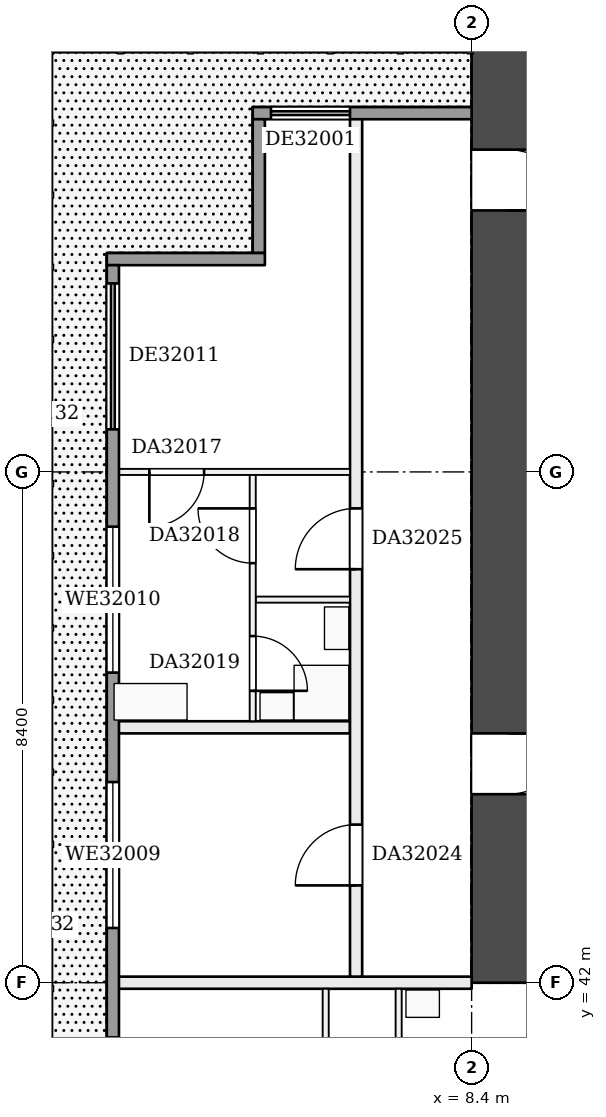
"""IFC4 building model, lengths in metres.
Left out: names, types, materials, properties, quantities, classifications, styles, units other than length and angle.
Written with IfcOpenShell. Run it as: python <this file> out.ifc"""

import sys

from ifc_helpers import new_model, si_unit, direction, frame, frame_2d, origin, place, context, subcontext, project, spatial, rectangle, extrude, element, fill, save


model = new_model("IFC4")
c1 = context("Model", 3, precision=1e-05, world=origin(), true_north=direction((0.0, 1.0)))
c2 = subcontext(c1, "Body", "Model", "MODEL_VIEW")
j1 = project(units=[si_unit("LENGTHUNIT", "METRE"), si_unit("PLANEANGLEUNIT", "RADIAN")], contexts=[c1])
p1 = place(None, origin())
s1 = spatial("IfcSite", under=j1, at=p1, CompositionType="ELEMENT")
p2 = place(p1, origin())
s2 = spatial("IfcBuilding", under=s1, at=p2, CompositionType="ELEMENT")
p3 = place(p2, frame((0.0, 0.0, 126.7)))
s3 = spatial("IfcBuildingStorey", under=s2, at=p3, CompositionType="ELEMENT", Elevation=126.7)
p4 = place(p3, frame((9.0, 58.8, 0.0), z_axis=(0.0, 0.0, 1.0), x_axis=(0.0, -1.0, 0.0)))
e1 = element("IfcWall", 1, at=p4, inside=s3, PredefinedType="SHEAR", context=c2, shape_type="SweptSolid", body=[
    extrude(rectangle(XDim=16.8, YDim=1.2, at=frame_2d((8.4, 0.0))), origin(), (0.0, 0.0, 1.0), 3.22),
])
p5 = place(p4, frame((3.1, 0.0, 0.0)))
e2 = element("IfcOpeningElement", 2, at=p5, cuts=e1, PredefinedType="OPENING", context=c2, shape_type="SweptSolid", body=[
    extrude(rectangle(XDim=1.0, YDim=2.1, at=frame_2d((0.5, 1.05))), frame((0.0, 0.61, 0.0), z_axis=(0.0, -1.0, 0.0), x_axis=(1.0, 0.0, 0.0)), (0.0, 0.0, 1.0), 1.22),
])
p6 = place(p4, frame((12.7, 0.0, 0.0)))
e3 = element("IfcOpeningElement", 3, at=p6, cuts=e1, PredefinedType="OPENING", context=c2, shape_type="SweptSolid", body=[
    extrude(rectangle(XDim=1.0, YDim=2.1, at=frame_2d((0.5, 1.05))), frame((0.0, 0.61, 0.0), z_axis=(0.0, -1.0, 0.0), x_axis=(1.0, 0.0, 0.0)), (0.0, 0.0, 1.0), 1.22),
])
p7 = place(p3, frame((2.5, 42.0, 0.0), z_axis=(0.0, 0.0, 1.0), x_axis=(1.0, 0.0, 0.0)))
e4 = element("IfcWall", 4, at=p7, inside=s3, PredefinedType="PARTITIONING", context=c2, shape_type="SweptSolid", body=[
    extrude(rectangle(XDim=5.9, YDim=0.2, at=frame_2d((2.95, 0.0))), origin(), (0.0, 0.0, 1.0), 3.22),
])
p8 = place(p3, frame((2.5, 46.2, 0.0), z_axis=(0.0, 0.0, 1.0), x_axis=(1.0, 0.0, 0.0)))
e5 = element("IfcWall", 5, at=p8, inside=s3, PredefinedType="PARTITIONING", context=c2, shape_type="SweptSolid", body=[
    extrude(rectangle(XDim=3.9, YDim=0.2, at=frame_2d((1.95, 0.0))), origin(), (0.0, 0.0, 1.0), 3.22),
])
p9 = place(p3, frame((4.85, 48.3, 0.0), z_axis=(0.0, 0.0, 1.0), x_axis=(1.0, 0.0, 0.0)))
e6 = element("IfcWall", 6, at=p9, inside=s3, PredefinedType="PARTITIONING", context=c2, shape_type="SweptSolid", body=[
    extrude(rectangle(XDim=1.55, YDim=0.1, at=frame_2d((0.775, 0.0))), origin(), (0.0, 0.0, 1.0), 3.22),
])
p10 = place(p3, frame((2.5, 50.4, 0.0), z_axis=(0.0, 0.0, 1.0), x_axis=(1.0, 0.0, 0.0)))
e7 = element("IfcWall", 7, at=p10, inside=s3, PredefinedType="PARTITIONING", context=c2, shape_type="SweptSolid", body=[
    extrude(rectangle(XDim=3.9, YDim=0.1, at=frame_2d((1.95, 0.0))), origin(), (0.0, 0.0, 1.0), 3.22),
])
p11 = place(p10, frame((0.6, 0.0, 0.0)))
e8 = element("IfcOpeningElement", 8, at=p11, cuts=e7, PredefinedType="OPENING", context=c2, shape_type="SweptSolid", body=[
    extrude(rectangle(XDim=0.9, YDim=2.1, at=frame_2d((0.45, 1.05))), frame((0.0, 0.06, 0.0), z_axis=(0.0, -1.0, 0.0), x_axis=(1.0, 0.0, 0.0)), (0.0, 0.0, 1.0), 0.12),
])
p12 = place(p3, frame((4.8, 46.3, 0.0), z_axis=(0.0, 0.0, 1.0), x_axis=(0.0, 1.0, 0.0)))
e9 = element("IfcWall", 9, at=p12, inside=s3, PredefinedType="PARTITIONING", context=c2, shape_type="SweptSolid", body=[
    extrude(rectangle(XDim=4.05, YDim=0.1, at=frame_2d((2.025, 0.0))), origin(), (0.0, 0.0, 1.0), 3.22),
])
p13 = place(p12, frame((2.6, 0.0, 0.0)))
e10 = element("IfcOpeningElement", 10, at=p13, cuts=e9, PredefinedType="OPENING", context=c2, shape_type="SweptSolid", body=[
    extrude(rectangle(XDim=0.9, YDim=2.1, at=frame_2d((0.45, 1.05))), frame((0.0, 0.06, 0.0), z_axis=(0.0, -1.0, 0.0), x_axis=(1.0, 0.0, 0.0)), (0.0, 0.0, 1.0), 0.12),
])
p14 = place(p12, frame((0.5, 0.0, 0.0)))
e11 = element("IfcOpeningElement", 11, at=p14, cuts=e9, PredefinedType="OPENING", context=c2, shape_type="SweptSolid", body=[
    extrude(rectangle(XDim=0.9, YDim=2.1, at=frame_2d((0.45, 1.05))), frame((0.0, 0.06, 0.0), z_axis=(0.0, -1.0, 0.0), x_axis=(1.0, 0.0, 0.0)), (0.0, 0.0, 1.0), 0.12),
])
p15 = place(p3, frame((6.0, 16.85, 0.0), z_axis=(0.0, 0.0, 1.0), x_axis=(0.0, 1.0, 0.0)))
e12 = element("IfcWall", 12, at=p15, inside=s3, PredefinedType="PARTITIONING", context=c2, shape_type="SweptSolid", body=[
    extrude(rectangle(XDim=25.05, YDim=0.1, at=frame_2d((12.525, 0.0))), origin(), (0.0, 0.0, 1.0), 3.22),
])
p16 = place(p15, frame((1.55, 0.0, 0.0)))
e13 = element("IfcOpeningElement", 13, at=p16, cuts=e12, PredefinedType="OPENING", context=c2, shape_type="SweptSolid", body=[
    extrude(rectangle(XDim=0.9, YDim=2.1, at=frame_2d((0.45, 1.05))), frame((0.0, 0.06, 0.0), z_axis=(0.0, -1.0, 0.0), x_axis=(1.0, 0.0, 0.0)), (0.0, 0.0, 1.0), 0.12),
])
p17 = place(p15, frame((5.75, 0.0, 0.0)))
e14 = element("IfcOpeningElement", 14, at=p17, cuts=e12, PredefinedType="OPENING", context=c2, shape_type="SweptSolid", body=[
    extrude(rectangle(XDim=0.9, YDim=2.1, at=frame_2d((0.45, 1.05))), frame((0.0, 0.06, 0.0), z_axis=(0.0, -1.0, 0.0), x_axis=(1.0, 0.0, 0.0)), (0.0, 0.0, 1.0), 0.12),
])
p18 = place(p15, frame((14.15, 0.0, 0.0)))
e15 = element("IfcOpeningElement", 15, at=p18, cuts=e12, PredefinedType="OPENING", context=c2, shape_type="SweptSolid", body=[
    extrude(rectangle(XDim=0.9, YDim=2.1, at=frame_2d((0.45, 1.05))), frame((0.0, 0.06, 0.0), z_axis=(0.0, -1.0, 0.0), x_axis=(1.0, 0.0, 0.0)), (0.0, 0.0, 1.0), 0.12),
])
p19 = place(p15, frame((22.55, 0.0, 0.0)))
e16 = element("IfcOpeningElement", 16, at=p19, cuts=e12, PredefinedType="OPENING", context=c2, shape_type="SweptSolid", body=[
    extrude(rectangle(XDim=0.9, YDim=2.1, at=frame_2d((0.45, 1.05))), frame((0.0, 0.06, 0.0), z_axis=(0.0, -1.0, 0.0), x_axis=(1.0, 0.0, 0.0)), (0.0, 0.0, 1.0), 0.12),
])
p20 = place(p3, frame((6.5, 42.1, 0.0), z_axis=(0.0, 0.0, 1.0), x_axis=(0.0, 1.0, 0.0)))
e17 = element("IfcWall", 17, at=p20, inside=s3, PredefinedType="PARTITIONING", context=c2, shape_type="SweptSolid", body=[
    extrude(rectangle(XDim=14.2, YDim=0.2, at=frame_2d((7.1, 0.0))), origin(), (0.0, 0.0, 1.0), 3.22),
])
p21 = place(p20, frame((1.5, 0.0, 0.0)))
e18 = element("IfcOpeningElement", 18, at=p21, cuts=e17, PredefinedType="OPENING", context=c2, shape_type="SweptSolid", body=[
    extrude(rectangle(XDim=1.0, YDim=2.1, at=frame_2d((0.5, 1.05))), frame((0.0, 0.11, 0.0), z_axis=(0.0, -1.0, 0.0), x_axis=(1.0, 0.0, 0.0)), (0.0, 0.0, 1.0), 0.22),
])
p22 = place(p20, frame((6.7, 0.0, 0.0)))
e19 = element("IfcOpeningElement", 19, at=p22, cuts=e17, PredefinedType="OPENING", context=c2, shape_type="SweptSolid", body=[
    extrude(rectangle(XDim=1.0, YDim=2.1, at=frame_2d((0.5, 1.05))), frame((0.0, 0.11, 0.0), z_axis=(0.0, -1.0, 0.0), x_axis=(1.0, 0.0, 0.0)), (0.0, 0.0, 1.0), 0.22),
])
p23 = place(p3, frame((7.2, 21.0, 0.0), z_axis=(0.0, 0.0, 1.0), x_axis=(0.0, 1.0, 0.0)))
e20 = element("IfcWall", 20, at=p23, inside=s3, PredefinedType="PARTITIONING", context=c2, shape_type="SweptSolid", body=[
    extrude(rectangle(XDim=20.9, YDim=0.1, at=frame_2d((10.45, 0.0))), origin(), (0.0, 0.0, 1.0), 3.22),
])
p24 = place(p23, frame((2.837, 0.0, 0.0)))
e21 = element("IfcOpeningElement", 21, at=p24, cuts=e20, PredefinedType="OPENING", context=c2, shape_type="SweptSolid", body=[
    extrude(rectangle(XDim=0.9, YDim=2.1, at=frame_2d((0.45, 1.05))), frame((0.0, 0.06, 0.0), z_axis=(0.0, -1.0, 0.0), x_axis=(1.0, 0.0, 0.0)), (0.0, 0.0, 1.0), 0.12),
])
p25 = place(p23, frame((0.5, 0.0, 0.0)))
e22 = element("IfcOpeningElement", 22, at=p25, cuts=e20, PredefinedType="OPENING", context=c2, shape_type="SweptSolid", body=[
    extrude(rectangle(XDim=0.9, YDim=2.1, at=frame_2d((0.45, 1.05))), frame((0.0, 0.06, 0.0), z_axis=(0.0, -1.0, 0.0), x_axis=(1.0, 0.0, 0.0)), (0.0, 0.0, 1.0), 0.12),
])
p26 = place(p23, frame((5.175, 0.0, 0.0)))
e23 = element("IfcOpeningElement", 23, at=p26, cuts=e20, PredefinedType="OPENING", context=c2, shape_type="SweptSolid", body=[
    extrude(rectangle(XDim=0.9, YDim=2.1, at=frame_2d((0.45, 1.05))), frame((0.0, 0.06, 0.0), z_axis=(0.0, -1.0, 0.0), x_axis=(1.0, 0.0, 0.0)), (0.0, 0.0, 1.0), 0.12),
])
p27 = place(p23, frame((7.613, 0.0, 0.0)))
e24 = element("IfcOpeningElement", 24, at=p27, cuts=e20, PredefinedType="OPENING", context=c2, shape_type="SweptSolid", body=[
    extrude(rectangle(XDim=0.9, YDim=2.1, at=frame_2d((0.45, 1.05))), frame((0.0, 0.06, 0.0), z_axis=(0.0, -1.0, 0.0), x_axis=(1.0, 0.0, 0.0)), (0.0, 0.0, 1.0), 0.12),
])
p28 = place(p23, frame((10.35, 0.0, 0.0)))
e25 = element("IfcOpeningElement", 25, at=p28, cuts=e20, PredefinedType="OPENING", context=c2, shape_type="SweptSolid", body=[
    extrude(rectangle(XDim=0.9, YDim=2.1, at=frame_2d((0.45, 1.05))), frame((0.0, 0.06, 0.0), z_axis=(0.0, -1.0, 0.0), x_axis=(1.0, 0.0, 0.0)), (0.0, 0.0, 1.0), 0.12),
])
p29 = place(p23, frame((13.088, 0.0, 0.0)))
e26 = element("IfcOpeningElement", 26, at=p29, cuts=e20, PredefinedType="OPENING", context=c2, shape_type="SweptSolid", body=[
    extrude(rectangle(XDim=0.9, YDim=2.1, at=frame_2d((0.45, 1.05))), frame((0.0, 0.06, 0.0), z_axis=(0.0, -1.0, 0.0), x_axis=(1.0, 0.0, 0.0)), (0.0, 0.0, 1.0), 0.12),
])
p30 = place(p23, frame((16.125, 0.0, 0.0)))
e27 = element("IfcOpeningElement", 27, at=p30, cuts=e20, PredefinedType="OPENING", context=c2, shape_type="SweptSolid", body=[
    extrude(rectangle(XDim=0.9, YDim=2.1, at=frame_2d((0.45, 1.05))), frame((0.0, 0.06, 0.0), z_axis=(0.0, -1.0, 0.0), x_axis=(1.0, 0.0, 0.0)), (0.0, 0.0, 1.0), 0.12),
])
p31 = place(p23, frame((19.163, 0.0, 0.0)))
e28 = element("IfcOpeningElement", 28, at=p31, cuts=e20, PredefinedType="OPENING", context=c2, shape_type="SweptSolid", body=[
    extrude(rectangle(XDim=0.9, YDim=2.1, at=frame_2d((0.45, 1.05))), frame((0.0, 0.06, 0.0), z_axis=(0.0, -1.0, 0.0), x_axis=(1.0, 0.0, 0.0)), (0.0, 0.0, 1.0), 0.12),
])
p32 = place(p3, frame((8.4, 56.3, 0.0), z_axis=(0.0, 0.0, 1.0), x_axis=(-1.0, 0.0, 0.0)))
e29 = element("IfcWall", 29, at=p32, inside=s3, PredefinedType="SOLIDWALL", context=c2, shape_type="SweptSolid", body=[
    extrude(rectangle(XDim=3.6, YDim=0.2, at=frame_2d((1.8, 0.0))), origin(), (0.0, 0.0, 1.0), 3.22),
])
p33 = place(p32, frame((2.0, 0.0, 0.0)))
e30 = element("IfcOpeningElement", 30, at=p33, cuts=e29, PredefinedType="OPENING", context=c2, shape_type="SweptSolid", body=[
    extrude(rectangle(XDim=1.3, YDim=2.2, at=frame_2d((0.65, 1.1))), frame((0.0, 0.11, 0.0), z_axis=(0.0, -1.0, 0.0), x_axis=(1.0, 0.0, 0.0)), (0.0, 0.0, 1.0), 0.22),
])
p34 = place(p3, frame((4.9, 56.2, 0.0), z_axis=(0.0, 0.0, 1.0), x_axis=(0.0, -1.0, 0.0)))
e31 = element("IfcWall", 31, at=p34, inside=s3, PredefinedType="SOLIDWALL", context=c2, shape_type="SweptSolid", body=[
    extrude(rectangle(XDim=2.2, YDim=0.2, at=frame_2d((1.1, 0.0))), origin(), (0.0, 0.0, 1.0), 3.22),
])
p35 = place(p3, frame((5.0, 53.9, 0.0), z_axis=(0.0, 0.0, 1.0), x_axis=(-1.0, 0.0, 0.0)))
e32 = element("IfcWall", 32, at=p35, inside=s3, PredefinedType="SOLIDWALL", context=c2, shape_type="SweptSolid", body=[
    extrude(rectangle(XDim=2.6, YDim=0.2, at=frame_2d((1.3, 0.0))), origin(), (0.0, 0.0, 1.0), 3.22),
])
p36 = place(p3, frame((2.5, 53.8, 0.0), z_axis=(0.0, 0.0, 1.0), x_axis=(0.0, -1.0, 0.0)))
e33 = element("IfcWall", 33, at=p36, inside=s3, PredefinedType="SOLIDWALL", context=c2, shape_type="SweptSolid", body=[
    extrude(rectangle(XDim=40.4, YDim=0.2, at=frame_2d((20.2, 0.0))), origin(), (0.0, 0.0, 1.0), 3.22),
])
p37 = place(p36, frame((37.7, 0.0, 0.9)))
e34 = element("IfcOpeningElement", 34, at=p37, cuts=e33, PredefinedType="OPENING", context=c2, shape_type="SweptSolid", body=[
    extrude(rectangle(XDim=2.4, YDim=1.5, at=frame_2d((1.2, 0.75))), frame((0.0, 0.11, 0.0), z_axis=(0.0, -1.0, 0.0), x_axis=(1.0, 0.0, 0.0)), (0.0, 0.0, 1.0), 0.22),
])
p38 = place(p36, frame((33.7, 0.0, 0.9)))
e35 = element("IfcOpeningElement", 35, at=p38, cuts=e33, PredefinedType="OPENING", context=c2, shape_type="SweptSolid", body=[
    extrude(rectangle(XDim=2.4, YDim=1.5, at=frame_2d((1.2, 0.75))), frame((0.0, 0.11, 0.0), z_axis=(0.0, -1.0, 0.0), x_axis=(1.0, 0.0, 0.0)), (0.0, 0.0, 1.0), 0.22),
])
p39 = place(p36, frame((29.5, 0.0, 0.9)))
e36 = element("IfcOpeningElement", 36, at=p39, cuts=e33, PredefinedType="OPENING", context=c2, shape_type="SweptSolid", body=[
    extrude(rectangle(XDim=2.4, YDim=1.5, at=frame_2d((1.2, 0.75))), frame((0.0, 0.11, 0.0), z_axis=(0.0, -1.0, 0.0), x_axis=(1.0, 0.0, 0.0)), (0.0, 0.0, 1.0), 0.22),
])
p40 = place(p36, frame((25.3, 0.0, 0.0)))
e37 = element("IfcOpeningElement", 37, at=p40, cuts=e33, PredefinedType="OPENING", context=c2, shape_type="SweptSolid", body=[
    extrude(rectangle(XDim=2.4, YDim=2.2, at=frame_2d((1.2, 1.1))), frame((0.0, 0.11, 0.0), z_axis=(0.0, -1.0, 0.0), x_axis=(1.0, 0.0, 0.0)), (0.0, 0.0, 1.0), 0.22),
])
p41 = place(p36, frame((21.1, 0.0, 0.0)))
e38 = element("IfcOpeningElement", 38, at=p41, cuts=e33, PredefinedType="OPENING", context=c2, shape_type="SweptSolid", body=[
    extrude(rectangle(XDim=2.4, YDim=2.2, at=frame_2d((1.2, 1.1))), frame((0.0, 0.11, 0.0), z_axis=(0.0, -1.0, 0.0), x_axis=(1.0, 0.0, 0.0)), (0.0, 0.0, 1.0), 0.22),
])
p42 = place(p36, frame((16.9, 0.0, 0.0)))
e39 = element("IfcOpeningElement", 39, at=p42, cuts=e33, PredefinedType="OPENING", context=c2, shape_type="SweptSolid", body=[
    extrude(rectangle(XDim=2.4, YDim=2.2, at=frame_2d((1.2, 1.1))), frame((0.0, 0.11, 0.0), z_axis=(0.0, -1.0, 0.0), x_axis=(1.0, 0.0, 0.0)), (0.0, 0.0, 1.0), 0.22),
])
p43 = place(p36, frame((12.7, 0.0, 0.9)))
e40 = element("IfcOpeningElement", 40, at=p43, cuts=e33, PredefinedType="OPENING", context=c2, shape_type="SweptSolid", body=[
    extrude(rectangle(XDim=2.4, YDim=1.5, at=frame_2d((1.2, 0.75))), frame((0.0, 0.11, 0.0), z_axis=(0.0, -1.0, 0.0), x_axis=(1.0, 0.0, 0.0)), (0.0, 0.0, 1.0), 0.22),
])
p44 = place(p36, frame((8.5, 0.0, 0.9)))
e41 = element("IfcOpeningElement", 41, at=p44, cuts=e33, PredefinedType="OPENING", context=c2, shape_type="SweptSolid", body=[
    extrude(rectangle(XDim=2.4, YDim=1.5, at=frame_2d((1.2, 0.75))), frame((0.0, 0.11, 0.0), z_axis=(0.0, -1.0, 0.0), x_axis=(1.0, 0.0, 0.0)), (0.0, 0.0, 1.0), 0.22),
])
p45 = place(p36, frame((4.3, 0.0, 0.9)))
e42 = element("IfcOpeningElement", 42, at=p45, cuts=e33, PredefinedType="OPENING", context=c2, shape_type="SweptSolid", body=[
    extrude(rectangle(XDim=2.4, YDim=1.5, at=frame_2d((1.2, 0.75))), frame((0.0, 0.11, 0.0), z_axis=(0.0, -1.0, 0.0), x_axis=(1.0, 0.0, 0.0)), (0.0, 0.0, 1.0), 0.22),
])
p46 = place(p36, frame((0.3, 0.0, 0.0)))
e43 = element("IfcOpeningElement", 43, at=p46, cuts=e33, PredefinedType="OPENING", context=c2, shape_type="SweptSolid", body=[
    extrude(rectangle(XDim=2.4, YDim=2.2, at=frame_2d((1.2, 1.1))), frame((0.0, 0.11, 0.0), z_axis=(0.0, -1.0, 0.0), x_axis=(1.0, 0.0, 0.0)), (0.0, 0.0, 1.0), 0.22),
])
p47 = place(p5, origin())
e44 = element("IfcDoor", 44, at=p47, inside=s3, OperationType="SINGLE_SWING_RIGHT", PredefinedType="DOOR", context=c2, shape_type="SweptSolid", body=[
    extrude(rectangle(XDim=1.0, YDim=2.1, at=frame_2d((0.5, 1.05))), frame((0.0, 0.025, 0.0), z_axis=(0.0, -1.0, 0.0), x_axis=(1.0, 0.0, 0.0)), (0.0, 0.0, 1.0), 0.05),
])
fill(e2, e44)
p48 = place(p6, origin())
e45 = element("IfcDoor", 45, at=p48, inside=s3, OperationType="SINGLE_SWING_LEFT", PredefinedType="DOOR", context=c2, shape_type="SweptSolid", body=[
    extrude(rectangle(XDim=1.0, YDim=2.1, at=frame_2d((0.5, 1.05))), frame((0.0, 0.025, 0.0), z_axis=(0.0, -1.0, 0.0), x_axis=(1.0, 0.0, 0.0)), (0.0, 0.0, 1.0), 0.05),
])
fill(e3, e45)
p49 = place(p11, frame((0.9, 0.0, 0.0), z_axis=(0.0, 0.0, 1.0), x_axis=(-1.0, 0.0, 0.0)))
e46 = element("IfcDoor", 46, at=p49, inside=s3, OperationType="SINGLE_SWING_RIGHT", PredefinedType="DOOR", context=c2, shape_type="SweptSolid", body=[
    extrude(rectangle(XDim=0.9, YDim=2.1, at=frame_2d((0.45, 1.05))), frame((0.0, 0.025, 0.0), z_axis=(0.0, -1.0, 0.0), x_axis=(1.0, 0.0, 0.0)), (0.0, 0.0, 1.0), 0.05),
])
fill(e8, e46)
p50 = place(p13, origin())
e47 = element("IfcDoor", 47, at=p50, inside=s3, OperationType="SINGLE_SWING_RIGHT", PredefinedType="DOOR", context=c2, shape_type="SweptSolid", body=[
    extrude(rectangle(XDim=0.9, YDim=2.1, at=frame_2d((0.45, 1.05))), frame((0.0, 0.025, 0.0), z_axis=(0.0, -1.0, 0.0), x_axis=(1.0, 0.0, 0.0)), (0.0, 0.0, 1.0), 0.05),
])
fill(e10, e47)
p51 = place(p14, frame((0.9, 0.0, 0.0), z_axis=(0.0, 0.0, 1.0), x_axis=(-1.0, 0.0, 0.0)))
e48 = element("IfcDoor", 48, at=p51, inside=s3, OperationType="SINGLE_SWING_RIGHT", PredefinedType="DOOR", context=c2, shape_type="SweptSolid", body=[
    extrude(rectangle(XDim=0.9, YDim=2.1, at=frame_2d((0.45, 1.05))), frame((0.0, 0.025, 0.0), z_axis=(0.0, -1.0, 0.0), x_axis=(1.0, 0.0, 0.0)), (0.0, 0.0, 1.0), 0.05),
])
fill(e11, e48)
p52 = place(p21, origin())
e49 = element("IfcDoor", 49, at=p52, inside=s3, OperationType="SINGLE_SWING_LEFT", PredefinedType="DOOR", context=c2, shape_type="SweptSolid", body=[
    extrude(rectangle(XDim=1.0, YDim=2.1, at=frame_2d((0.5, 1.05))), frame((0.0, 0.025, 0.0), z_axis=(0.0, -1.0, 0.0), x_axis=(1.0, 0.0, 0.0)), (0.0, 0.0, 1.0), 0.05),
])
fill(e18, e49)
p53 = place(p22, origin())
e50 = element("IfcDoor", 50, at=p53, inside=s3, OperationType="SINGLE_SWING_LEFT", PredefinedType="DOOR", context=c2, shape_type="SweptSolid", body=[
    extrude(rectangle(XDim=1.0, YDim=2.1, at=frame_2d((0.5, 1.05))), frame((0.0, 0.025, 0.0), z_axis=(0.0, -1.0, 0.0), x_axis=(1.0, 0.0, 0.0)), (0.0, 0.0, 1.0), 0.05),
])
fill(e19, e50)
p54 = place(p33, origin())
e51 = element("IfcDoor", 51, at=p54, inside=s3, OperationType="DOUBLE_DOOR_SLIDING", PredefinedType="DOOR", context=c2, shape_type="SweptSolid", body=[
    extrude(rectangle(XDim=1.3, YDim=2.2, at=frame_2d((0.65, 1.1))), frame((0.0, 0.025, 0.0), z_axis=(0.0, -1.0, 0.0), x_axis=(1.0, 0.0, 0.0)), (0.0, 0.0, 1.0), 0.05),
])
fill(e30, e51)
p55 = place(p44, origin())
e52 = element("IfcWindow", 52, at=p55, inside=s3, PartitioningType="SINGLE_PANEL", PredefinedType="WINDOW", context=c2, shape_type="SweptSolid", body=[
    extrude(rectangle(XDim=2.4, YDim=1.5, at=frame_2d((1.2, 0.75))), frame((0.0, 0.03, 0.0), z_axis=(0.0, -1.0, 0.0), x_axis=(1.0, 0.0, 0.0)), (0.0, 0.0, 1.0), 0.06),
])
fill(e41, e52)
p56 = place(p45, origin())
e53 = element("IfcWindow", 53, at=p56, inside=s3, PartitioningType="SINGLE_PANEL", PredefinedType="WINDOW", context=c2, shape_type="SweptSolid", body=[
    extrude(rectangle(XDim=2.4, YDim=1.5, at=frame_2d((1.2, 0.75))), frame((0.0, 0.03, 0.0), z_axis=(0.0, -1.0, 0.0), x_axis=(1.0, 0.0, 0.0)), (0.0, 0.0, 1.0), 0.06),
])
fill(e42, e53)
p57 = place(p46, origin())
e54 = element("IfcDoor", 54, at=p57, inside=s3, OperationType="DOUBLE_DOOR_SLIDING", PredefinedType="DOOR", context=c2, shape_type="SweptSolid", body=[
    extrude(rectangle(XDim=2.4, YDim=2.2, at=frame_2d((1.2, 1.1))), frame((0.0, 0.025, 0.0), z_axis=(0.0, -1.0, 0.0), x_axis=(1.0, 0.0, 0.0)), (0.0, 0.0, 1.0), 0.05),
])
fill(e43, e54)
save(model, sys.argv[1])
